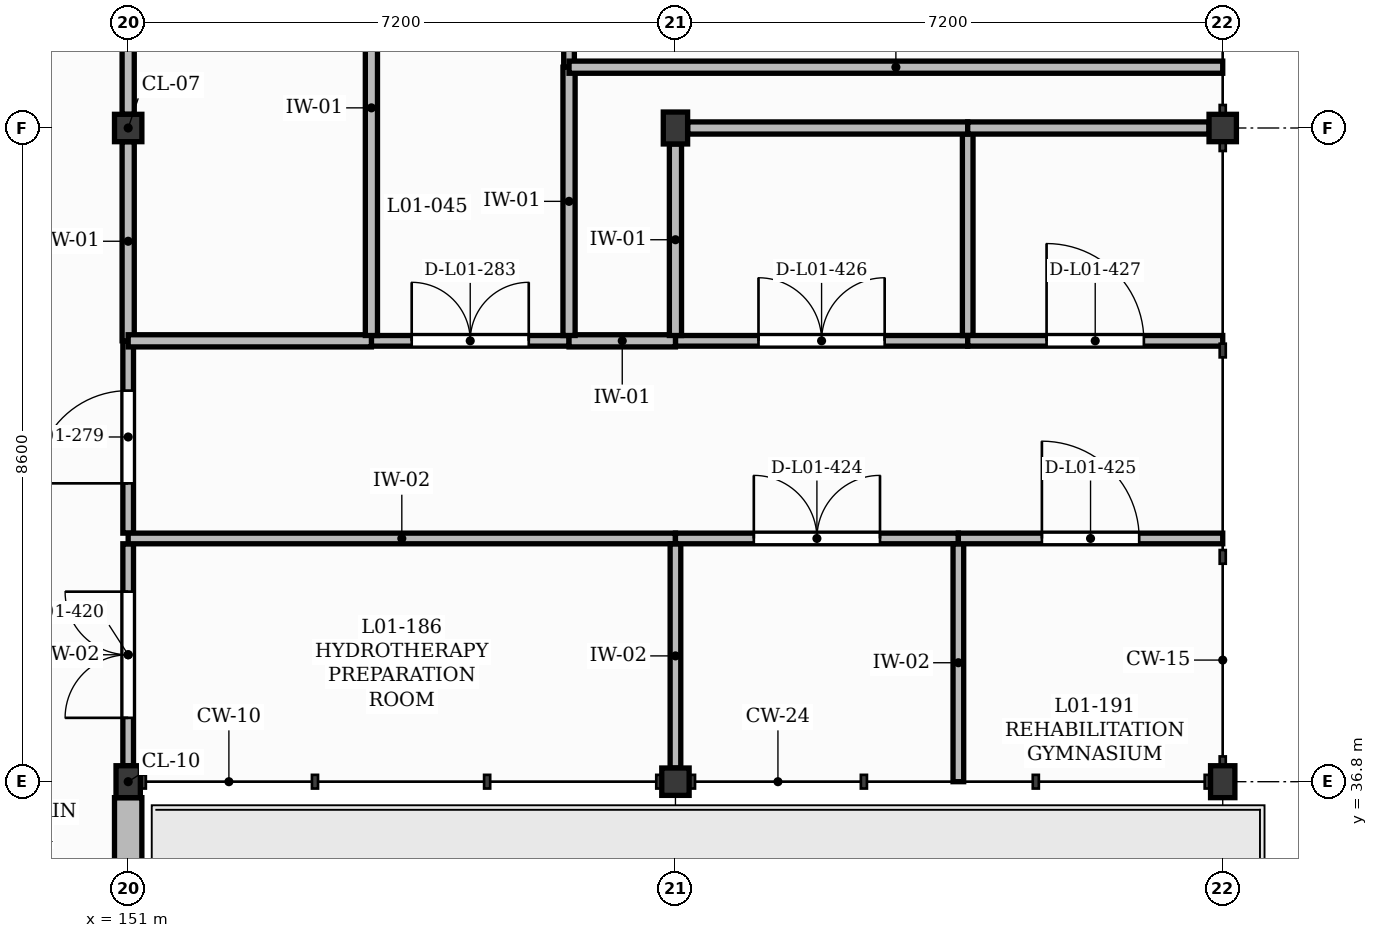
"""IFC4 building model, lengths in metres.
Left out: names, types, materials, properties, quantities, classifications, styles, units other than length and angle.
Written with IfcOpenShell. Run it as: python <this file> out.ifc"""

import sys

from ifc_helpers import new_model, si_unit, direction, frame, frame_2d, origin, origin_2d, place, context, subcontext, project, spatial, rectangle, extrude, element, fill, save


model = new_model("IFC4")
c1 = context("Model", 3, precision=1e-05, world=origin(), true_north=direction((0.0, 1.0)))
c2 = subcontext(c1, "Body", "Model", "MODEL_VIEW")
j1 = project(units=[si_unit("LENGTHUNIT", "METRE"), si_unit("PLANEANGLEUNIT", "RADIAN")], contexts=[c1])
p1 = place(None, origin())
s1 = spatial("IfcSite", under=j1, at=p1, CompositionType="ELEMENT")
p2 = place(p1, origin())
s2 = spatial("IfcBuilding", under=s1, at=p2, CompositionType="ELEMENT")
p3 = place(p2, frame((0.0, 0.0, 4.5)))
s3 = spatial("IfcBuildingStorey", under=s2, at=p3, CompositionType="ELEMENT", Elevation=4.5)
p4 = place(p3, frame((151.0, 36.8, 0.0), z_axis=(0.0, 0.0, 1.0), x_axis=(1.0, 0.0, 0.0)))
e1 = element("IfcColumn", 1, at=p4, inside=s3, PredefinedType="COLUMN", context=c2, shape_type="SweptSolid", body=[
    extrude(rectangle(XDim=0.32, YDim=0.42, at=origin_2d()), origin(), (0.0, 0.0, 1.0), 4.26),
])
for number, where, z_axis, x_axis in (
    (2, (151.0, 45.4, 0.0), (0.0, 0.0, 1.0), (1.0, 0.0, 0.0)),
    (3, (158.2, 36.8, 0.0), (0.0, 0.0, 1.0), (1.0, 0.0, 0.0)),
):
    element("IfcColumn", number, at=place(p3, frame(where, z_axis=z_axis, x_axis=x_axis)), inside=s3, PredefinedType="COLUMN", context=c2, shape_type="SweptSolid", body=[
        extrude(rectangle(XDim=0.36, YDim=0.36, at=origin_2d()), origin(), (0.0, 0.0, 1.0), 4.26),
    ])
for number, where, z_axis, x_axis in (
    (4, (158.2, 45.4, 0.0), (0.0, 0.0, 1.0), (1.0, 0.0, 0.0)),
    (5, (165.4, 36.8, 0.0), (0.0, 0.0, 1.0), (1.0, 0.0, 0.0)),
):
    element("IfcColumn", number, at=place(p3, frame(where, z_axis=z_axis, x_axis=x_axis)), inside=s3, PredefinedType="COLUMN", context=c2, shape_type="SweptSolid", body=[
        extrude(rectangle(XDim=0.32, YDim=0.42, at=origin_2d()), origin(), (0.0, 0.0, 1.0), 4.26),
    ])
p5 = place(p3, frame((165.4, 45.4, 0.0), z_axis=(0.0, 0.0, 1.0), x_axis=(1.0, 0.0, 0.0)))
e6 = element("IfcColumn", 6, at=p5, inside=s3, PredefinedType="COLUMN", context=c2, shape_type="SweptSolid", body=[
    extrude(rectangle(XDim=0.36, YDim=0.36, at=origin_2d()), origin(), (0.0, 0.0, 1.0), 4.26),
])
p6 = place(p3, frame((151.0, 27.38, 0.0), z_axis=(0.0, 0.0, 1.0), x_axis=(0.0, 1.0, 0.0)))
e7 = element("IfcWall", 7, at=p6, inside=s3, PredefinedType="SOLIDWALL", context=c2, shape_type="SweptSolid", body=[
    extrude(rectangle(XDim=9.21, YDim=0.36, at=frame_2d((4.605, 0.0))), origin(), (0.0, 0.0, 1.0), 3.8),
])
p7 = place(p6, frame((3.655, 0.0, 0.0)))
e8 = element("IfcOpeningElement", 8, at=p7, cuts=e7, PredefinedType="OPENING", context=c2, shape_type="SweptSolid", body=[
    extrude(rectangle(XDim=1.9, YDim=2.5, at=frame_2d((0.95, 1.25))), frame((0.0, 0.19, 0.0), z_axis=(0.0, -1.0, 0.0), x_axis=(1.0, 0.0, 0.0)), (0.0, 0.0, 1.0), 0.38),
])
p8 = place(p6, frame((0.958, 0.0, 0.9)))
e9 = element("IfcOpeningElement", 9, at=p8, cuts=e7, PredefinedType="OPENING", context=c2, shape_type="SweptSolid", body=[
    extrude(rectangle(XDim=1.8, YDim=2.4, at=frame_2d((0.9, 1.2))), frame((0.0, 0.19, 0.0), z_axis=(0.0, -1.0, 0.0), x_axis=(1.0, 0.0, 0.0)), (0.0, 0.0, 1.0), 0.38),
])
p9 = place(p6, frame((6.377, 0.0, 0.9)))
e10 = element("IfcOpeningElement", 10, at=p9, cuts=e7, PredefinedType="OPENING", context=c2, shape_type="SweptSolid", body=[
    extrude(rectangle(XDim=1.95, YDim=2.4, at=frame_2d((0.975, 1.2))), frame((0.0, 0.19, 0.0), z_axis=(0.0, -1.0, 0.0), x_axis=(1.0, 0.0, 0.0)), (0.0, 0.0, 1.0), 0.38),
])
p10 = place(p3, frame((151.0, 37.01, 0.0), z_axis=(0.0, 0.0, 1.0), x_axis=(0.0, 1.0, 0.0)))
e11 = element("IfcWall", 11, at=p10, inside=s3, PredefinedType="PARTITIONING", context=c2, shape_type="SweptSolid", body=[
    extrude(rectangle(XDim=2.92, YDim=0.14, at=frame_2d((1.46, 0.0))), origin(), (0.0, 0.0, 1.0), 3.62),
])
p11 = place(p10, frame((0.63, 0.0, 0.0)))
e12 = element("IfcOpeningElement", 12, at=p11, cuts=e11, PredefinedType="OPENING", context=c2, shape_type="SweptSolid", body=[
    extrude(rectangle(XDim=1.66, YDim=2.3, at=frame_2d((0.83, 1.15))), frame((0.0, 0.08, 0.0), z_axis=(0.0, -1.0, 0.0), x_axis=(1.0, 0.0, 0.0)), (0.0, 0.0, 1.0), 0.16),
])
p12 = place(p3, frame((151.0, 40.07, 0.0), z_axis=(0.0, 0.0, 1.0), x_axis=(0.0, 1.0, 0.0)))
e13 = element("IfcWall", 13, at=p12, inside=s3, PredefinedType="PARTITIONING", context=c2, shape_type="SweptSolid", body=[
    extrude(rectangle(XDim=2.53, YDim=0.14, at=frame_2d((1.265, 0.0))), origin(), (0.0, 0.0, 1.0), 3.62),
])
p13 = place(p12, frame((0.655, 0.0, 0.0)))
e14 = element("IfcOpeningElement", 14, at=p13, cuts=e13, PredefinedType="OPENING", context=c2, shape_type="SweptSolid", body=[
    extrude(rectangle(XDim=1.22, YDim=2.1, at=frame_2d((0.61, 1.05))), frame((0.0, 0.08, 0.0), z_axis=(0.0, -1.0, 0.0), x_axis=(1.0, 0.0, 0.0)), (0.0, 0.0, 1.0), 0.16),
])
p14 = place(p3, frame((151.0, 40.0, 0.0), z_axis=(0.0, 0.0, 1.0), x_axis=(1.0, 0.0, 0.0)))
e15 = element("IfcWall", 15, at=p14, inside=s3, PredefinedType="PARTITIONING", context=c2, shape_type="SweptSolid", body=[
    extrude(rectangle(XDim=7.2, YDim=0.14, at=frame_2d((3.6, 0.0))), origin(), (0.0, 0.0, 1.0), 4.18),
])
p15 = place(p3, frame((154.2, 42.6, 0.0), z_axis=(0.0, 0.0, 1.0), x_axis=(1.0, 0.0, 0.0)))
e16 = element("IfcWall", 16, at=p15, inside=s3, PredefinedType="PARTITIONING", context=c2, shape_type="SweptSolid", body=[
    extrude(rectangle(XDim=2.6, YDim=0.14, at=frame_2d((1.3, 0.0))), origin(), (0.0, 0.0, 1.0), 4.18),
])
p16 = place(p15, frame((0.53, 0.0, 0.0)))
e17 = element("IfcOpeningElement", 17, at=p16, cuts=e16, PredefinedType="OPENING", context=c2, shape_type="SweptSolid", body=[
    extrude(rectangle(XDim=1.54, YDim=2.25, at=frame_2d((0.77, 1.125))), frame((0.0, 0.08, 0.0), z_axis=(0.0, -1.0, 0.0), x_axis=(1.0, 0.0, 0.0)), (0.0, 0.0, 1.0), 0.16),
])
p17 = place(p3, frame((156.8, 46.2, 0.0), z_axis=(0.0, 0.0, 1.0), x_axis=(0.0, 1.0, 0.0)))
e18 = element("IfcWall", 18, at=p17, inside=s3, PredefinedType="PARTITIONING", context=c2, shape_type="SweptSolid", body=[
    extrude(rectangle(XDim=2.46, YDim=0.14, at=frame_2d((1.23, 0.0))), origin(), (0.0, 0.0, 1.0), 4.18),
])
p18 = place(p17, frame((0.62, 0.0, 0.0)))
e19 = element("IfcOpeningElement", 19, at=p18, cuts=e18, PredefinedType="OPENING", context=c2, shape_type="SweptSolid", body=[
    extrude(rectangle(XDim=1.22, YDim=2.1, at=frame_2d((0.61, 1.05))), frame((0.0, 0.08, 0.0), z_axis=(0.0, -1.0, 0.0), x_axis=(1.0, 0.0, 0.0)), (0.0, 0.0, 1.0), 0.16),
])
p19 = place(p3, frame((158.2, 36.98, 0.0), z_axis=(0.0, 0.0, 1.0), x_axis=(0.0, 1.0, 0.0)))
e20 = element("IfcWall", 20, at=p19, inside=s3, PredefinedType="PARTITIONING", context=c2, shape_type="SweptSolid", body=[
    extrude(rectangle(XDim=2.95, YDim=0.14, at=frame_2d((1.475, 0.0))), origin(), (0.0, 0.0, 1.0), 3.62),
])
p20 = place(p3, frame((158.2, 40.0, 0.0), z_axis=(0.0, 0.0, 1.0), x_axis=(1.0, 0.0, 0.0)))
e21 = element("IfcWall", 21, at=p20, inside=s3, PredefinedType="PARTITIONING", context=c2, shape_type="SweptSolid", body=[
    extrude(rectangle(XDim=3.722, YDim=0.14, at=frame_2d((1.861, 0.0))), origin(), (0.0, 0.0, 1.0), 4.18),
])
p21 = place(p20, frame((1.031, 0.0, 0.0)))
e22 = element("IfcOpeningElement", 22, at=p21, cuts=e21, PredefinedType="OPENING", context=c2, shape_type="SweptSolid", body=[
    extrude(rectangle(XDim=1.66, YDim=2.3, at=frame_2d((0.83, 1.15))), frame((0.0, 0.08, 0.0), z_axis=(0.0, -1.0, 0.0), x_axis=(1.0, 0.0, 0.0)), (0.0, 0.0, 1.0), 0.16),
])
p22 = place(p3, frame((158.2, 42.6, 0.0), z_axis=(0.0, 0.0, 1.0), x_axis=(1.0, 0.0, 0.0)))
e23 = element("IfcWall", 23, at=p22, inside=s3, PredefinedType="PARTITIONING", context=c2, shape_type="SweptSolid", body=[
    extrude(rectangle(XDim=3.845, YDim=0.14, at=frame_2d((1.922, 0.0))), origin(), (0.0, 0.0, 1.0), 4.18),
])
p23 = place(p22, frame((1.093, 0.0, 0.0)))
e24 = element("IfcOpeningElement", 24, at=p23, cuts=e23, PredefinedType="OPENING", context=c2, shape_type="SweptSolid", body=[
    extrude(rectangle(XDim=1.66, YDim=2.3, at=frame_2d((0.83, 1.15))), frame((0.0, 0.08, 0.0), z_axis=(0.0, -1.0, 0.0), x_axis=(1.0, 0.0, 0.0)), (0.0, 0.0, 1.0), 0.16),
])
p24 = place(p3, frame((161.922, 36.8, 0.0), z_axis=(0.0, 0.0, 1.0), x_axis=(0.0, 1.0, 0.0)))
e25 = element("IfcWall", 25, at=p24, inside=s3, PredefinedType="PARTITIONING", context=c2, shape_type="SweptSolid", body=[
    extrude(rectangle(XDim=3.13, YDim=0.14, at=frame_2d((1.565, 0.0))), origin(), (0.0, 0.0, 1.0), 4.18),
])
p25 = place(p3, frame((161.922, 40.0, 0.0), z_axis=(0.0, 0.0, 1.0), x_axis=(1.0, 0.0, 0.0)))
e26 = element("IfcWall", 26, at=p25, inside=s3, PredefinedType="PARTITIONING", context=c2, shape_type="SweptSolid", body=[
    extrude(rectangle(XDim=3.478, YDim=0.14, at=frame_2d((1.739, 0.0))), origin(), (0.0, 0.0, 1.0), 4.18),
])
p26 = place(p25, frame((1.099, 0.0, 0.0)))
e27 = element("IfcOpeningElement", 27, at=p26, cuts=e26, PredefinedType="OPENING", context=c2, shape_type="SweptSolid", body=[
    extrude(rectangle(XDim=1.28, YDim=2.2, at=frame_2d((0.64, 1.1))), frame((0.0, 0.08, 0.0), z_axis=(0.0, -1.0, 0.0), x_axis=(1.0, 0.0, 0.0)), (0.0, 0.0, 1.0), 0.16),
])
p27 = place(p3, frame((162.045, 42.67, 0.0), z_axis=(0.0, 0.0, 1.0), x_axis=(0.0, 1.0, 0.0)))
e28 = element("IfcWall", 28, at=p27, inside=s3, PredefinedType="PARTITIONING", context=c2, shape_type="SweptSolid", body=[
    extrude(rectangle(XDim=2.73, YDim=0.14, at=frame_2d((1.365, 0.0))), origin(), (0.0, 0.0, 1.0), 4.18),
])
p28 = place(p3, frame((162.045, 42.6, 0.0), z_axis=(0.0, 0.0, 1.0), x_axis=(1.0, 0.0, 0.0)))
e29 = element("IfcWall", 29, at=p28, inside=s3, PredefinedType="PARTITIONING", context=c2, shape_type="SweptSolid", body=[
    extrude(rectangle(XDim=3.355, YDim=0.14, at=frame_2d((1.677, 0.0))), origin(), (0.0, 0.0, 1.0), 4.18),
])
p29 = place(p28, frame((1.038, 0.0, 0.0)))
e30 = element("IfcOpeningElement", 30, at=p29, cuts=e29, PredefinedType="OPENING", context=c2, shape_type="SweptSolid", body=[
    extrude(rectangle(XDim=1.28, YDim=2.2, at=frame_2d((0.64, 1.1))), frame((0.0, 0.08, 0.0), z_axis=(0.0, -1.0, 0.0), x_axis=(1.0, 0.0, 0.0)), (0.0, 0.0, 1.0), 0.16),
])
p30 = place(p3, frame((151.0, 42.6, 0.0), z_axis=(0.0, 0.0, 1.0), x_axis=(0.0, 1.0, 0.0)))
e31 = element("IfcWall", 31, at=p30, inside=s3, PredefinedType="PARTITIONING", context=c2, shape_type="SweptSolid", body=[
    extrude(rectangle(XDim=2.62, YDim=0.16, at=frame_2d((1.31, 0.0))), origin(), (0.0, 0.0, 1.0), 3.62),
])
p31 = place(p3, frame((151.0, 45.58, 0.0), z_axis=(0.0, 0.0, 1.0), x_axis=(0.0, 1.0, 0.0)))
e32 = element("IfcWall", 32, at=p31, inside=s3, PredefinedType="PARTITIONING", context=c2, shape_type="SweptSolid", body=[
    extrude(rectangle(XDim=2.35, YDim=0.16, at=frame_2d((1.175, 0.0))), origin(), (0.0, 0.0, 1.0), 3.74),
])
p32 = place(p3, frame((158.2, 42.6, 0.0), z_axis=(0.0, 0.0, 1.0), x_axis=(-1.0, 0.0, 0.0)))
e33 = element("IfcWall", 33, at=p32, inside=s3, PredefinedType="PARTITIONING", context=c2, shape_type="SweptSolid", body=[
    extrude(rectangle(XDim=1.4, YDim=0.16, at=frame_2d((0.7, 0.0))), origin(), (0.0, 0.0, 1.0), 4.18),
])
p33 = place(p3, frame((154.2, 42.6, 0.0), z_axis=(0.0, 0.0, 1.0), x_axis=(-1.0, 0.0, 0.0)))
e34 = element("IfcWall", 34, at=p33, inside=s3, PredefinedType="PARTITIONING", context=c2, shape_type="SweptSolid", body=[
    extrude(rectangle(XDim=3.2, YDim=0.16, at=frame_2d((1.6, 0.0))), origin(), (0.0, 0.0, 1.0), 4.18),
])
p34 = place(p3, frame((156.8, 42.67, 0.0), z_axis=(0.0, 0.0, 1.0), x_axis=(0.0, 1.0, 0.0)))
e35 = element("IfcWall", 35, at=p34, inside=s3, PredefinedType="PARTITIONING", context=c2, shape_type="SweptSolid", body=[
    extrude(rectangle(XDim=3.53, YDim=0.16, at=frame_2d((1.765, 0.0))), origin(), (0.0, 0.0, 1.0), 4.18),
])
p35 = place(p3, frame((154.2, 42.67, 0.0), z_axis=(0.0, 0.0, 1.0), x_axis=(0.0, 1.0, 0.0)))
e36 = element("IfcWall", 36, at=p35, inside=s3, PredefinedType="PARTITIONING", context=c2, shape_type="SweptSolid", body=[
    extrude(rectangle(XDim=5.99, YDim=0.16, at=frame_2d((2.995, 0.0))), origin(), (0.0, 0.0, 1.0), 4.18),
])
p36 = place(p3, frame((156.8, 46.2, 0.0), z_axis=(0.0, 0.0, 1.0), x_axis=(1.0, 0.0, 0.0)))
e37 = element("IfcWall", 37, at=p36, inside=s3, PredefinedType="PARTITIONING", context=c2, shape_type="SweptSolid", body=[
    extrude(rectangle(XDim=8.6, YDim=0.16, at=frame_2d((4.3, 0.0))), origin(), (0.0, 0.0, 1.0), 4.18),
])
p37 = place(p3, frame((162.045, 45.4, 0.0), z_axis=(0.0, 0.0, 1.0), x_axis=(-1.0, 0.0, 0.0)))
e38 = element("IfcWall", 38, at=p37, inside=s3, PredefinedType="PARTITIONING", context=c2, shape_type="SweptSolid", body=[
    extrude(rectangle(XDim=3.685, YDim=0.16, at=frame_2d((1.842, 0.0))), origin(), (0.0, 0.0, 1.0), 3.66),
])
p38 = place(p3, frame((158.2, 42.67, 0.0), z_axis=(0.0, 0.0, 1.0), x_axis=(0.0, 1.0, 0.0)))
e39 = element("IfcWall", 39, at=p38, inside=s3, PredefinedType="PARTITIONING", context=c2, shape_type="SweptSolid", body=[
    extrude(rectangle(XDim=2.52, YDim=0.16, at=frame_2d((1.26, 0.0))), origin(), (0.0, 0.0, 1.0), 3.62),
])
p39 = place(p3, frame((165.22, 45.4, 0.0), z_axis=(0.0, 0.0, 1.0), x_axis=(-1.0, 0.0, 0.0)))
e40 = element("IfcWall", 40, at=p39, inside=s3, PredefinedType="PARTITIONING", context=c2, shape_type="SweptSolid", body=[
    extrude(rectangle(XDim=3.175, YDim=0.16, at=frame_2d((1.587, 0.0))), origin(), (0.0, 0.0, 1.0), 3.66),
])
p40 = place(p13, origin())
e41 = element("IfcDoor", 41, at=p40, inside=s3, OperationType="SINGLE_SWING_LEFT", PredefinedType="DOOR", context=c2, shape_type="SweptSolid", body=[
    extrude(rectangle(XDim=1.22, YDim=2.1, at=frame_2d((0.61, 1.05))), frame((0.0, 0.025, 0.0), z_axis=(0.0, -1.0, 0.0), x_axis=(1.0, 0.0, 0.0)), (0.0, 0.0, 1.0), 0.05),
])
fill(e14, e41)
p41 = place(p16, origin())
e42 = element("IfcDoor", 42, at=p41, inside=s3, OperationType="DOUBLE_DOOR_SINGLE_SWING", PredefinedType="DOOR", context=c2, shape_type="SweptSolid", body=[
    extrude(rectangle(XDim=1.54, YDim=2.25, at=frame_2d((0.77, 1.125))), frame((0.0, 0.025, 0.0), z_axis=(0.0, -1.0, 0.0), x_axis=(1.0, 0.0, 0.0)), (0.0, 0.0, 1.0), 0.05),
])
fill(e17, e42)
p42 = place(p11, origin())
e43 = element("IfcDoor", 43, at=p42, inside=s3, OperationType="DOUBLE_DOOR_SINGLE_SWING", PredefinedType="DOOR", context=c2, shape_type="SweptSolid", body=[
    extrude(rectangle(XDim=1.66, YDim=2.3, at=frame_2d((0.83, 1.15))), frame((0.0, 0.025, 0.0), z_axis=(0.0, -1.0, 0.0), x_axis=(1.0, 0.0, 0.0)), (0.0, 0.0, 1.0), 0.05),
])
fill(e12, e43)
p43 = place(p21, origin())
e44 = element("IfcDoor", 44, at=p43, inside=s3, OperationType="DOUBLE_DOOR_SINGLE_SWING", PredefinedType="DOOR", context=c2, shape_type="SweptSolid", body=[
    extrude(rectangle(XDim=1.66, YDim=2.3, at=frame_2d((0.83, 1.15))), frame((0.0, 0.025, 0.0), z_axis=(0.0, -1.0, 0.0), x_axis=(1.0, 0.0, 0.0)), (0.0, 0.0, 1.0), 0.05),
])
fill(e22, e44)
p44 = place(p26, origin())
e45 = element("IfcDoor", 45, at=p44, inside=s3, OperationType="SINGLE_SWING_LEFT", PredefinedType="DOOR", context=c2, shape_type="SweptSolid", body=[
    extrude(rectangle(XDim=1.28, YDim=2.2, at=frame_2d((0.64, 1.1))), frame((0.0, 0.025, 0.0), z_axis=(0.0, -1.0, 0.0), x_axis=(1.0, 0.0, 0.0)), (0.0, 0.0, 1.0), 0.05),
])
fill(e27, e45)
p45 = place(p23, origin())
e46 = element("IfcDoor", 46, at=p45, inside=s3, OperationType="DOUBLE_DOOR_SINGLE_SWING", PredefinedType="DOOR", context=c2, shape_type="SweptSolid", body=[
    extrude(rectangle(XDim=1.66, YDim=2.3, at=frame_2d((0.83, 1.15))), frame((0.0, 0.025, 0.0), z_axis=(0.0, -1.0, 0.0), x_axis=(1.0, 0.0, 0.0)), (0.0, 0.0, 1.0), 0.05),
])
fill(e24, e46)
p46 = place(p29, origin())
e47 = element("IfcDoor", 47, at=p46, inside=s3, OperationType="SINGLE_SWING_LEFT", PredefinedType="DOOR", context=c2, shape_type="SweptSolid", body=[
    extrude(rectangle(XDim=1.28, YDim=2.2, at=frame_2d((0.64, 1.1))), frame((0.0, 0.025, 0.0), z_axis=(0.0, -1.0, 0.0), x_axis=(1.0, 0.0, 0.0)), (0.0, 0.0, 1.0), 0.05),
])
fill(e30, e47)
save(model, sys.argv[1])
